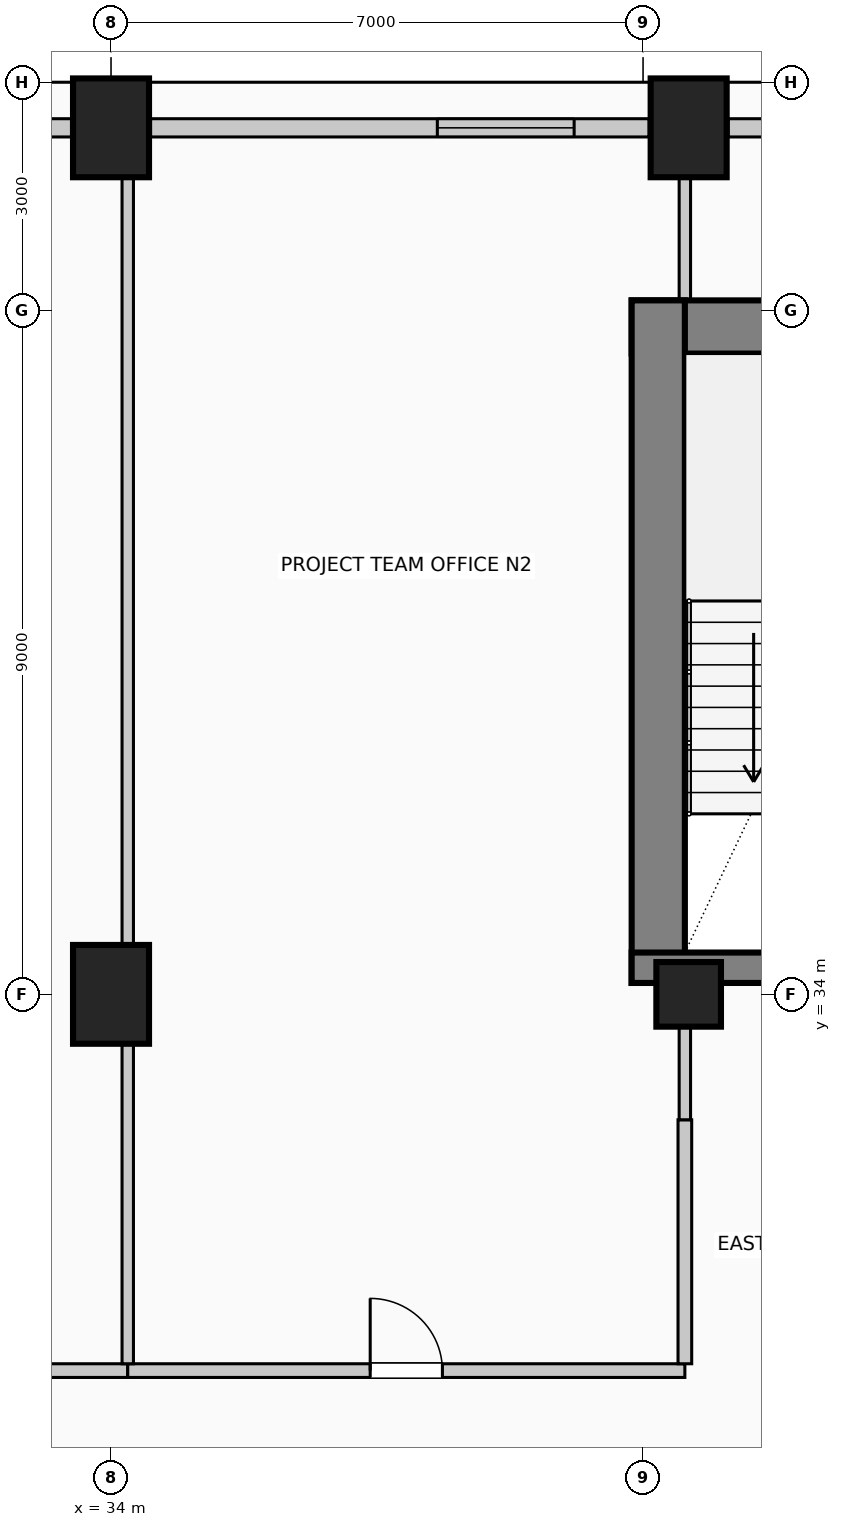
"""IFC4 building model, lengths in metres.
Left out: names, types, materials, properties, quantities, classifications, styles, units other than length and angle.
Written with IfcOpenShell. Run it as: python <this file> out.ifc"""

import sys

from ifc_helpers import new_model, si_unit, direction, frame, frame_2d, origin, origin_2d, place, context, subcontext, project, spatial, rectangle, circle, extrude, element, fill, save


model = new_model("IFC4")
c1 = context("Model", 3, precision=1e-05, world=origin(), true_north=direction((0.0, 1.0)))
c2 = subcontext(c1, "Body", "Model", "MODEL_VIEW")
j1 = project(units=[si_unit("LENGTHUNIT", "METRE"), si_unit("PLANEANGLEUNIT", "RADIAN")], contexts=[c1])
p1 = place(None, origin())
s1 = spatial("IfcSite", under=j1, at=p1, CompositionType="ELEMENT")
p2 = place(p1, origin())
s2 = spatial("IfcBuilding", under=s1, at=p2, CompositionType="ELEMENT")
p3 = place(p2, frame((0.0, 0.0, 206.6)))
s3 = spatial("IfcBuildingStorey", under=s2, at=p3, CompositionType="ELEMENT", Elevation=206.6)
p4 = place(p3, frame((40.85, 42.78, 0.0), z_axis=(0.0, 0.0, 1.0), x_axis=(1.0, 0.0, 0.0)))
e1 = element("IfcWall", 1, at=p4, inside=s3, PredefinedType="SHEAR", context=c2, shape_type="SweptSolid", body=[
    extrude(rectangle(XDim=14.3, YDim=0.7, at=frame_2d((7.15, 0.0))), origin(), (0.0, 0.0, 1.0), 4.0),
])
p5 = place(p3, frame((41.2, 34.15, 0.0), z_axis=(0.0, 0.0, 1.0), x_axis=(0.0, 1.0, 0.0)))
e2 = element("IfcWall", 2, at=p5, inside=s3, PredefinedType="SHEAR", context=c2, shape_type="SweptSolid", body=[
    extrude(rectangle(XDim=8.98, YDim=0.7, at=frame_2d((4.49, 0.0))), origin(), (0.0, 0.0, 1.0), 4.0),
])
p6 = place(p3, frame((40.85, 34.35, 0.0), z_axis=(0.0, 0.0, 1.0), x_axis=(1.0, 0.0, 0.0)))
e3 = element("IfcWall", 3, at=p6, inside=s3, PredefinedType="SHEAR", context=c2, shape_type="SweptSolid", body=[
    extrude(rectangle(XDim=4.86, YDim=0.4, at=frame_2d((2.43, 0.0))), origin(), (0.0, 0.0, 1.0), 4.0),
])
p7 = place(p6, frame((2.4, 0.0, 0.0)))
e4 = element("IfcOpeningElement", 4, at=p7, cuts=e3, PredefinedType="OPENING", context=c2, shape_type="SweptSolid", body=[
    extrude(rectangle(XDim=1.15, YDim=2.2, at=frame_2d((0.575, 1.1))), frame((0.0, 0.21, 0.0), z_axis=(0.0, -1.0, 0.0), x_axis=(1.0, 0.0, 0.0)), (0.0, 0.0, 1.0), 0.42),
])
for number, where, z_axis, x_axis in (
    (5, (34.0, 45.4, 0.0), (0.0, 0.0, 1.0), (1.0, 0.0, 0.0)),
    (6, (41.6, 45.4, 0.0), (0.0, 0.0, 1.0), (1.0, 0.0, 0.0)),
    (7, (34.0, 34.0, 0.0), (0.0, 0.0, 1.0), (1.0, 0.0, 0.0)),
):
    element("IfcColumn", number, at=place(p3, frame(where, z_axis=z_axis, x_axis=x_axis)), inside=s3, PredefinedType="COLUMN", context=c2, shape_type="SweptSolid", body=[
        extrude(rectangle(XDim=1.0, YDim=1.3, at=origin_2d()), origin(), (0.0, 0.0, 1.0), 4.0),
    ])
p8 = place(p3, frame((41.6, 34.0, 0.0), z_axis=(0.0, 0.0, 1.0), x_axis=(1.0, 0.0, 0.0)))
e8 = element("IfcColumn", 8, at=p8, inside=s3, PredefinedType="COLUMN", context=c2, shape_type="SweptSolid", body=[
    extrude(circle(Radius=0.425, at=origin_2d()), origin(), (0.0, 0.0, 1.0), 4.0),
])
p9 = place(p3, frame((29.42, 45.4, 0.0), z_axis=(0.0, 0.0, 1.0), x_axis=(1.0, 0.0, 0.0)))
e9 = element("IfcWall", 9, at=p9, inside=s3, PredefinedType="SOLIDWALL", context=c2, shape_type="SweptSolid", body=[
    extrude(rectangle(XDim=4.06, YDim=0.24, at=frame_2d((2.03, 0.0))), origin(), (0.0, 0.0, 1.0), 3.0),
])
p10 = place(p9, frame((1.13, 0.0, 0.42)))
e10 = element("IfcOpeningElement", 10, at=p10, cuts=e9, PredefinedType="OPENING", context=c2, shape_type="SweptSolid", body=[
    extrude(rectangle(XDim=1.8, YDim=2.2, at=frame_2d((0.9, 1.1))), frame((0.0, 0.13, 0.0), z_axis=(0.0, -1.0, 0.0), x_axis=(1.0, 0.0, 0.0)), (0.0, 0.0, 1.0), 0.26),
])
p11 = place(p3, frame((34.52, 45.4, 0.0), z_axis=(0.0, 0.0, 1.0), x_axis=(1.0, 0.0, 0.0)))
e11 = element("IfcWall", 11, at=p11, inside=s3, PredefinedType="SOLIDWALL", context=c2, shape_type="SweptSolid", body=[
    extrude(rectangle(XDim=6.56, YDim=0.24, at=frame_2d((3.28, 0.0))), origin(), (0.0, 0.0, 1.0), 3.0),
])
p12 = place(p11, frame((3.773, 0.0, 0.42)))
e12 = element("IfcOpeningElement", 12, at=p12, cuts=e11, PredefinedType="OPENING", context=c2, shape_type="SweptSolid", body=[
    extrude(rectangle(XDim=1.8, YDim=2.2, at=frame_2d((0.9, 1.1))), frame((0.0, 0.13, 0.0), z_axis=(0.0, -1.0, 0.0), x_axis=(1.0, 0.0, 0.0)), (0.0, 0.0, 1.0), 0.26),
])
p13 = place(p3, frame((42.12, 45.4, 0.0), z_axis=(0.0, 0.0, 1.0), x_axis=(1.0, 0.0, 0.0)))
e13 = element("IfcWall", 13, at=p13, inside=s3, PredefinedType="SOLIDWALL", context=c2, shape_type="SweptSolid", body=[
    extrude(rectangle(XDim=1.46, YDim=0.24, at=frame_2d((0.73, 0.0))), origin(), (0.0, 0.0, 1.0), 3.0),
])
p14 = place(p3, frame((23.1, 29.05, 0.0), z_axis=(0.0, 0.0, 1.0), x_axis=(1.0, 0.0, 0.0)))
e14 = element("IfcWall", 14, at=p14, inside=s3, PredefinedType="PARTITIONING", context=c2, shape_type="SweptSolid", body=[
    extrude(rectangle(XDim=11.12, YDim=0.18, at=frame_2d((5.56, 0.0))), origin(), (0.0, 0.0, 1.0), 3.75),
])
p15 = place(p14, frame((5.035, 0.0, 0.0)))
e15 = element("IfcOpeningElement", 15, at=p15, cuts=e14, PredefinedType="OPENING", context=c2, shape_type="SweptSolid", body=[
    extrude(rectangle(XDim=1.05, YDim=2.15, at=frame_2d((0.525, 1.075))), frame((0.0, 0.1, 0.0), z_axis=(0.0, -1.0, 0.0), x_axis=(1.0, 0.0, 0.0)), (0.0, 0.0, 1.0), 0.2),
])
p16 = place(p3, frame((34.22, 29.05, 0.0), z_axis=(0.0, 0.0, 1.0), x_axis=(1.0, 0.0, 0.0)))
e16 = element("IfcWall", 16, at=p16, inside=s3, PredefinedType="PARTITIONING", context=c2, shape_type="SweptSolid", body=[
    extrude(rectangle(XDim=7.33, YDim=0.18, at=frame_2d((3.665, 0.0))), origin(), (0.0, 0.0, 1.0), 3.75),
])
p17 = place(p16, frame((3.19, 0.0, 0.0)))
e17 = element("IfcOpeningElement", 17, at=p17, cuts=e16, PredefinedType="OPENING", context=c2, shape_type="SweptSolid", body=[
    extrude(rectangle(XDim=0.95, YDim=2.15, at=frame_2d((0.475, 1.075))), frame((0.0, 0.1, 0.0), z_axis=(0.0, -1.0, 0.0), x_axis=(1.0, 0.0, 0.0)), (0.0, 0.0, 1.0), 0.2),
])
p18 = place(p3, frame((34.22, 29.14, 0.0), z_axis=(0.0, 0.0, 1.0), x_axis=(0.0, 1.0, 0.0)))
e18 = element("IfcWall", 18, at=p18, inside=s3, PredefinedType="PARTITIONING", context=c2, shape_type="SweptSolid", body=[
    extrude(rectangle(XDim=4.21, YDim=0.15, at=frame_2d((2.105, 0.0))), origin(), (0.0, 0.0, 1.0), 3.145),
])
p19 = place(p3, frame((34.22, 34.65, 0.0), z_axis=(0.0, 0.0, 1.0), x_axis=(0.0, 1.0, 0.0)))
e19 = element("IfcWall", 19, at=p19, inside=s3, PredefinedType="PARTITIONING", context=c2, shape_type="SweptSolid", body=[
    extrude(rectangle(XDim=10.1, YDim=0.15, at=frame_2d((5.05, 0.0))), origin(), (0.0, 0.0, 1.0), 3.145),
])
p20 = place(p3, frame((41.55, 29.14, 0.0), z_axis=(0.0, 0.0, 1.0), x_axis=(0.0, 1.0, 0.0)))
e20 = element("IfcWall", 20, at=p20, inside=s3, PredefinedType="PARTITIONING", context=c2, shape_type="SweptSolid", body=[
    extrude(rectangle(XDim=3.21, YDim=0.18, at=frame_2d((1.605, 0.0))), origin(), (0.0, 0.0, 1.0), 3.145),
])
p21 = place(p3, frame((41.55, 32.35, 0.0), z_axis=(0.0, 0.0, 1.0), x_axis=(0.0, 1.0, 0.0)))
e21 = element("IfcWall", 21, at=p21, inside=s3, PredefinedType="PARTITIONING", context=c2, shape_type="SweptSolid", body=[
    extrude(rectangle(XDim=1.225, YDim=0.15, at=frame_2d((0.612, 0.0))), origin(), (0.0, 0.0, 1.0), 3.145),
])
p22 = place(p3, frame((41.55, 43.13, 0.0), z_axis=(0.0, 0.0, 1.0), x_axis=(0.0, 1.0, 0.0)))
e22 = element("IfcWall", 22, at=p22, inside=s3, PredefinedType="PARTITIONING", context=c2, shape_type="SweptSolid", body=[
    extrude(rectangle(XDim=1.62, YDim=0.15, at=frame_2d((0.81, 0.0))), origin(), (0.0, 0.0, 1.0), 3.75),
])
p23 = place(p12, origin())
e23 = element("IfcWindow", 23, at=p23, inside=s3, PartitioningType="SINGLE_PANEL", PredefinedType="WINDOW", context=c2, shape_type="SweptSolid", body=[
    extrude(rectangle(XDim=1.8, YDim=2.2, at=frame_2d((0.9, 1.1))), frame((0.0, 0.03, 0.0), z_axis=(0.0, -1.0, 0.0), x_axis=(1.0, 0.0, 0.0)), (0.0, 0.0, 1.0), 0.06),
])
fill(e12, e23)
p24 = place(p17, origin())
e24 = element("IfcDoor", 24, at=p24, inside=s3, OperationType="SINGLE_SWING_LEFT", PredefinedType="DOOR", context=c2, shape_type="SweptSolid", body=[
    extrude(rectangle(XDim=0.95, YDim=2.15, at=frame_2d((0.475, 1.075))), frame((0.0, 0.025, 0.0), z_axis=(0.0, -1.0, 0.0), x_axis=(1.0, 0.0, 0.0)), (0.0, 0.0, 1.0), 0.05),
])
fill(e17, e24)
save(model, sys.argv[1])
